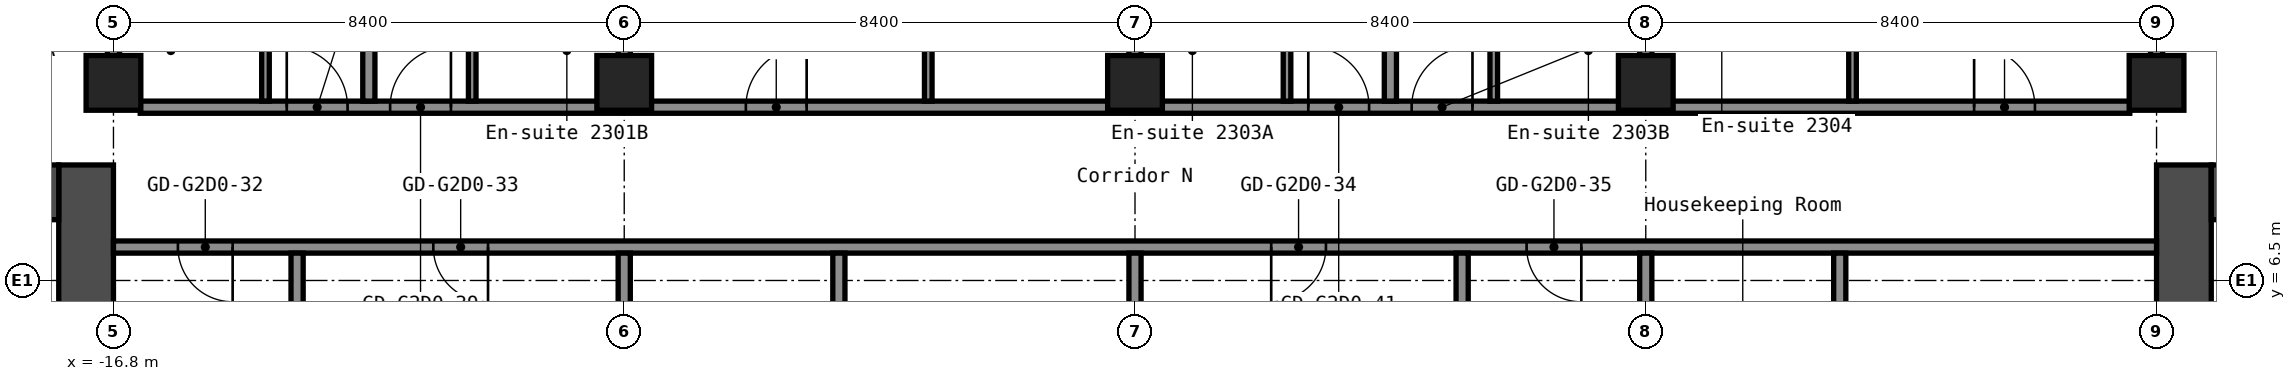
"""IFC4 building model, lengths in metres.
Left out: names, types, materials, properties, quantities, classifications, styles, units other than length and angle.
Written with IfcOpenShell. Run it as: python <this file> out.ifc"""

import sys

from ifc_helpers import new_model, si_unit, direction, frame, frame_2d, origin, origin_2d, place, context, subcontext, project, spatial, rectangle, hollow_rectangle, extrude, element, fill, save


model = new_model("IFC4")
c1 = context("Model", 3, precision=1e-05, world=origin(), true_north=direction((0.0, 1.0)))
c2 = subcontext(c1, "Body", "Model", "MODEL_VIEW")
j1 = project(units=[si_unit("LENGTHUNIT", "METRE"), si_unit("PLANEANGLEUNIT", "RADIAN")], contexts=[c1])
p1 = place(None, origin())
s1 = spatial("IfcSite", under=j1, at=p1, CompositionType="ELEMENT")
p2 = place(p1, origin())
s2 = spatial("IfcBuilding", under=s1, at=p2, CompositionType="ELEMENT")
p3 = place(p2, frame((0.0, 0.0, 85.0)))
s3 = spatial("IfcBuildingStorey", under=s2, at=p3, CompositionType="ELEMENT", Elevation=85.0)
for number, where, z_axis, x_axis in (
    (1, (-16.8, 9.75, 0.0), (0.0, 0.0, 1.0), (1.0, 0.0, 0.0)),
    (2, (-8.4, 9.75, 0.0), (0.0, 0.0, 1.0), (1.0, 0.0, 0.0)),
    (3, (0.0, 9.75, 0.0), (0.0, 0.0, 1.0), (1.0, 0.0, 0.0)),
    (4, (8.4, 9.75, 0.0), (0.0, 0.0, 1.0), (1.0, 0.0, 0.0)),
    (5, (16.8, 9.75, 0.0), (0.0, 0.0, 1.0), (1.0, 0.0, 0.0)),
):
    element("IfcColumn", number, at=place(p3, frame(where, z_axis=z_axis, x_axis=x_axis)), inside=s3, PredefinedType="COLUMN", context=c2, shape_type="SweptSolid", body=[
        extrude(hollow_rectangle(XDim=0.9, YDim=0.9, WallThickness=0.036, at=origin_2d()), origin(), (0.0, 0.0, 1.0), 2.8),
    ])
p4 = place(p3, frame((-17.25, -8.4, 0.0), z_axis=(0.0, 0.0, 1.0), x_axis=(0.0, 1.0, 0.0)))
e6 = element("IfcWall", 6, at=p4, inside=s3, PredefinedType="SHEAR", context=c2, shape_type="SweptSolid", body=[
    extrude(rectangle(XDim=16.8, YDim=0.9, at=frame_2d((8.4, 0.0))), origin(), (0.0, 0.0, 1.0), 2.8),
])
p5 = place(p4, frame((7.6, 0.0, 0.0)))
e7 = element("IfcOpeningElement", 7, at=p5, cuts=e6, PredefinedType="OPENING", context=c2, shape_type="SweptSolid", body=[
    extrude(rectangle(XDim=1.2, YDim=2.1, at=frame_2d((0.6, 1.05))), frame((0.0, 0.46, 0.0), z_axis=(0.0, -1.0, 0.0), x_axis=(1.0, 0.0, 0.0)), (0.0, 0.0, 1.0), 0.92),
])
p6 = place(p3, frame((-32.7, 7.95, 0.0), z_axis=(0.0, 0.0, 1.0), x_axis=(1.0, 0.0, 0.0)))
e8 = element("IfcWall", 8, at=p6, inside=s3, PredefinedType="SHEAR", context=c2, shape_type="SweptSolid", body=[
    extrude(rectangle(XDim=15.0, YDim=0.9, at=frame_2d((7.5, 0.0))), origin(), (0.0, 0.0, 1.0), 2.8),
])
p7 = place(p6, frame((3.4, 0.0, 0.0)))
e9 = element("IfcOpeningElement", 9, at=p7, cuts=e8, PredefinedType="OPENING", context=c2, shape_type="SweptSolid", body=[
    extrude(rectangle(XDim=1.2, YDim=2.1, at=frame_2d((0.6, 1.05))), frame((0.0, 0.46, 0.0), z_axis=(0.0, -1.0, 0.0), x_axis=(1.0, 0.0, 0.0)), (0.0, 0.0, 1.0), 0.92),
])
p8 = place(p6, frame((0.75, 0.0, 0.0)))
e10 = element("IfcOpeningElement", 10, at=p8, cuts=e8, PredefinedType="OPENING", context=c2, shape_type="SweptSolid", body=[
    extrude(rectangle(XDim=0.9, YDim=2.1, at=frame_2d((0.45, 1.05))), frame((0.0, 0.46, 0.0), z_axis=(0.0, -1.0, 0.0), x_axis=(1.0, 0.0, 0.0)), (0.0, 0.0, 1.0), 0.92),
])
p9 = place(p3, frame((17.25, -8.4, 0.0), z_axis=(0.0, 0.0, 1.0), x_axis=(0.0, 1.0, 0.0)))
e11 = element("IfcWall", 11, at=p9, inside=s3, PredefinedType="SHEAR", context=c2, shape_type="SweptSolid", body=[
    extrude(rectangle(XDim=16.8, YDim=0.9, at=frame_2d((8.4, 0.0))), origin(), (0.0, 0.0, 1.0), 2.8),
])
p10 = place(p9, frame((7.6, 0.0, 0.0)))
e12 = element("IfcOpeningElement", 12, at=p10, cuts=e11, PredefinedType="OPENING", context=c2, shape_type="SweptSolid", body=[
    extrude(rectangle(XDim=1.2, YDim=2.1, at=frame_2d((0.6, 1.05))), frame((0.0, 0.46, 0.0), z_axis=(0.0, -1.0, 0.0), x_axis=(1.0, 0.0, 0.0)), (0.0, 0.0, 1.0), 0.92),
])
p11 = place(p3, frame((17.7, 7.95, 0.0), z_axis=(0.0, 0.0, 1.0), x_axis=(1.0, 0.0, 0.0)))
e13 = element("IfcWall", 13, at=p11, inside=s3, PredefinedType="SHEAR", context=c2, shape_type="SweptSolid", body=[
    extrude(rectangle(XDim=15.0, YDim=0.9, at=frame_2d((7.5, 0.0))), origin(), (0.0, 0.0, 1.0), 2.8),
])
p12 = place(p11, frame((10.4, 0.0, 0.0)))
e14 = element("IfcOpeningElement", 14, at=p12, cuts=e13, PredefinedType="OPENING", context=c2, shape_type="SweptSolid", body=[
    extrude(rectangle(XDim=1.2, YDim=2.1, at=frame_2d((0.6, 1.05))), frame((0.0, 0.46, 0.0), z_axis=(0.0, -1.0, 0.0), x_axis=(1.0, 0.0, 0.0)), (0.0, 0.0, 1.0), 0.92),
])
p13 = place(p11, frame((13.35, 0.0, 0.0)))
e15 = element("IfcOpeningElement", 15, at=p13, cuts=e13, PredefinedType="OPENING", context=c2, shape_type="SweptSolid", body=[
    extrude(rectangle(XDim=0.9, YDim=2.1, at=frame_2d((0.45, 1.05))), frame((0.0, 0.46, 0.0), z_axis=(0.0, -1.0, 0.0), x_axis=(1.0, 0.0, 0.0)), (0.0, 0.0, 1.0), 0.92),
])
p14 = place(p3, frame((-16.8, 7.05, 0.0), z_axis=(0.0, 0.0, 1.0), x_axis=(1.0, 0.0, 0.0)))
e16 = element("IfcWall", 16, at=p14, inside=s3, PredefinedType="PARTITIONING", context=c2, shape_type="SweptSolid", body=[
    extrude(rectangle(XDim=33.6, YDim=0.2, at=frame_2d((16.8, 0.0))), origin(), (0.0, 0.0, 1.0), 2.8),
])
p15 = place(p14, frame((1.06, 0.0, 0.0)))
e17 = element("IfcOpeningElement", 17, at=p15, cuts=e16, PredefinedType="OPENING", context=c2, shape_type="SweptSolid", body=[
    extrude(rectangle(XDim=0.9, YDim=2.1, at=frame_2d((0.45, 1.05))), frame((0.0, 0.11, 0.0), z_axis=(0.0, -1.0, 0.0), x_axis=(1.0, 0.0, 0.0)), (0.0, 0.0, 1.0), 0.22),
])
p16 = place(p14, frame((5.26, 0.0, 0.0)))
e18 = element("IfcOpeningElement", 18, at=p16, cuts=e16, PredefinedType="OPENING", context=c2, shape_type="SweptSolid", body=[
    extrude(rectangle(XDim=0.9, YDim=2.1, at=frame_2d((0.45, 1.05))), frame((0.0, 0.11, 0.0), z_axis=(0.0, -1.0, 0.0), x_axis=(1.0, 0.0, 0.0)), (0.0, 0.0, 1.0), 0.22),
])
p17 = place(p14, frame((19.04, 0.0, 0.0)))
e19 = element("IfcOpeningElement", 19, at=p17, cuts=e16, PredefinedType="OPENING", context=c2, shape_type="SweptSolid", body=[
    extrude(rectangle(XDim=0.9, YDim=2.1, at=frame_2d((0.45, 1.05))), frame((0.0, 0.11, 0.0), z_axis=(0.0, -1.0, 0.0), x_axis=(1.0, 0.0, 0.0)), (0.0, 0.0, 1.0), 0.22),
])
p18 = place(p14, frame((23.24, 0.0, 0.0)))
e20 = element("IfcOpeningElement", 20, at=p18, cuts=e16, PredefinedType="OPENING", context=c2, shape_type="SweptSolid", body=[
    extrude(rectangle(XDim=0.9, YDim=2.1, at=frame_2d((0.45, 1.05))), frame((0.0, 0.11, 0.0), z_axis=(0.0, -1.0, 0.0), x_axis=(1.0, 0.0, 0.0)), (0.0, 0.0, 1.0), 0.22),
])
p19 = place(p3, frame((-16.36, 9.35, 0.0), z_axis=(0.0, 0.0, 1.0), x_axis=(1.0, 0.0, 0.0)))
e21 = element("IfcWall", 21, at=p19, inside=s3, PredefinedType="PARTITIONING", context=c2, shape_type="SweptSolid", body=[
    extrude(rectangle(XDim=32.72, YDim=0.2, at=frame_2d((16.36, 0.0))), origin(), (0.0, 0.0, 1.0), 2.8),
])
p20 = place(p19, frame((2.41, 0.0, 0.0)))
e22 = element("IfcOpeningElement", 22, at=p20, cuts=e21, PredefinedType="OPENING", context=c2, shape_type="SweptSolid", body=[
    extrude(rectangle(XDim=1.0, YDim=2.1, at=frame_2d((0.5, 1.05))), frame((0.0, 0.11, 0.0), z_axis=(0.0, -1.0, 0.0), x_axis=(1.0, 0.0, 0.0)), (0.0, 0.0, 1.0), 0.22),
])
p21 = place(p19, frame((4.11, 0.0, 0.0)))
e23 = element("IfcOpeningElement", 23, at=p21, cuts=e21, PredefinedType="OPENING", context=c2, shape_type="SweptSolid", body=[
    extrude(rectangle(XDim=1.0, YDim=2.1, at=frame_2d((0.5, 1.05))), frame((0.0, 0.11, 0.0), z_axis=(0.0, -1.0, 0.0), x_axis=(1.0, 0.0, 0.0)), (0.0, 0.0, 1.0), 0.22),
])
p22 = place(p19, frame((9.96, 0.0, 0.0)))
e24 = element("IfcOpeningElement", 24, at=p22, cuts=e21, PredefinedType="OPENING", context=c2, shape_type="SweptSolid", body=[
    extrude(rectangle(XDim=1.0, YDim=2.1, at=frame_2d((0.5, 1.05))), frame((0.0, 0.11, 0.0), z_axis=(0.0, -1.0, 0.0), x_axis=(1.0, 0.0, 0.0)), (0.0, 0.0, 1.0), 0.22),
])
p23 = place(p19, frame((19.21, 0.0, 0.0)))
e25 = element("IfcOpeningElement", 25, at=p23, cuts=e21, PredefinedType="OPENING", context=c2, shape_type="SweptSolid", body=[
    extrude(rectangle(XDim=1.0, YDim=2.1, at=frame_2d((0.5, 1.05))), frame((0.0, 0.11, 0.0), z_axis=(0.0, -1.0, 0.0), x_axis=(1.0, 0.0, 0.0)), (0.0, 0.0, 1.0), 0.22),
])
p24 = place(p19, frame((20.91, 0.0, 0.0)))
e26 = element("IfcOpeningElement", 26, at=p24, cuts=e21, PredefinedType="OPENING", context=c2, shape_type="SweptSolid", body=[
    extrude(rectangle(XDim=1.0, YDim=2.1, at=frame_2d((0.5, 1.05))), frame((0.0, 0.11, 0.0), z_axis=(0.0, -1.0, 0.0), x_axis=(1.0, 0.0, 0.0)), (0.0, 0.0, 1.0), 0.22),
])
p25 = place(p19, frame((30.16, 0.0, 0.0)))
e27 = element("IfcOpeningElement", 27, at=p25, cuts=e21, PredefinedType="OPENING", context=c2, shape_type="SweptSolid", body=[
    extrude(rectangle(XDim=1.0, YDim=2.1, at=frame_2d((0.5, 1.05))), frame((0.0, 0.11, 0.0), z_axis=(0.0, -1.0, 0.0), x_axis=(1.0, 0.0, 0.0)), (0.0, 0.0, 1.0), 0.22),
])
p26 = place(p3, frame((-16.8, 10.19, 0.0), z_axis=(0.0, 0.0, 1.0), x_axis=(0.0, 1.0, 0.0)))
e28 = element("IfcWall", 28, at=p26, inside=s3, PredefinedType="PARTITIONING", context=c2, shape_type="SweptSolid", body=[
    extrude(rectangle(XDim=13.36, YDim=0.2, at=frame_2d((6.68, 0.0))), origin(), (0.0, 0.0, 1.0), 2.8),
])
p27 = place(p3, frame((-14.3, 9.45, 0.0), z_axis=(0.0, 0.0, 1.0), x_axis=(0.0, 1.0, 0.0)))
e29 = element("IfcWall", 29, at=p27, inside=s3, PredefinedType="PARTITIONING", context=c2, shape_type="SweptSolid", body=[
    extrude(rectangle(XDim=2.9, YDim=0.125, at=frame_2d((1.45, 0.0))), origin(), (0.0, 0.0, 1.0), 2.8),
])
p28 = place(p27, frame((1.5, 0.0, 0.0)))
e30 = element("IfcOpeningElement", 30, at=p28, cuts=e29, PredefinedType="OPENING", context=c2, shape_type="SweptSolid", body=[
    extrude(rectangle(XDim=0.8, YDim=2.1, at=frame_2d((0.4, 1.05))), frame((0.0, 0.073, 0.0), z_axis=(0.0, -1.0, 0.0), x_axis=(1.0, 0.0, 0.0)), (0.0, 0.0, 1.0), 0.145),
])
p29 = place(p3, frame((-13.78, 1.05, 0.0), z_axis=(0.0, 0.0, 1.0), x_axis=(0.0, 1.0, 0.0)))
e31 = element("IfcWall", 31, at=p29, inside=s3, PredefinedType="PARTITIONING", context=c2, shape_type="SweptSolid", body=[
    extrude(rectangle(XDim=5.9, YDim=0.2, at=frame_2d((2.95, 0.0))), origin(), (0.0, 0.0, 1.0), 2.8),
])
p30 = place(p3, frame((-12.6, 9.45, 0.0), z_axis=(0.0, 0.0, 1.0), x_axis=(0.0, 1.0, 0.0)))
e32 = element("IfcWall", 32, at=p30, inside=s3, PredefinedType="PARTITIONING", context=c2, shape_type="SweptSolid", body=[
    extrude(rectangle(XDim=14.1, YDim=0.2, at=frame_2d((7.05, 0.0))), origin(), (0.0, 0.0, 1.0), 2.8),
])
p31 = place(p3, frame((-10.9, 9.45, 0.0), z_axis=(0.0, 0.0, 1.0), x_axis=(0.0, 1.0, 0.0)))
e33 = element("IfcWall", 33, at=p31, inside=s3, PredefinedType="PARTITIONING", context=c2, shape_type="SweptSolid", body=[
    extrude(rectangle(XDim=2.9, YDim=0.125, at=frame_2d((1.45, 0.0))), origin(), (0.0, 0.0, 1.0), 2.8),
])
p32 = place(p31, frame((1.5, 0.0, 0.0)))
e34 = element("IfcOpeningElement", 34, at=p32, cuts=e33, PredefinedType="OPENING", context=c2, shape_type="SweptSolid", body=[
    extrude(rectangle(XDim=0.8, YDim=2.1, at=frame_2d((0.4, 1.05))), frame((0.0, 0.073, 0.0), z_axis=(0.0, -1.0, 0.0), x_axis=(1.0, 0.0, 0.0)), (0.0, 0.0, 1.0), 0.145),
])
p33 = place(p3, frame((-8.4, 1.05, 0.0), z_axis=(0.0, 0.0, 1.0), x_axis=(0.0, 1.0, 0.0)))
e35 = element("IfcWall", 35, at=p33, inside=s3, PredefinedType="PARTITIONING", context=c2, shape_type="SweptSolid", body=[
    extrude(rectangle(XDim=5.9, YDim=0.2, at=frame_2d((2.95, 0.0))), origin(), (0.0, 0.0, 1.0), 2.8),
])
p34 = place(p3, frame((-8.4, 10.19, 0.0), z_axis=(0.0, 0.0, 1.0), x_axis=(0.0, 1.0, 0.0)))
e36 = element("IfcWall", 36, at=p34, inside=s3, PredefinedType="PARTITIONING", context=c2, shape_type="SweptSolid", body=[
    extrude(rectangle(XDim=13.36, YDim=0.2, at=frame_2d((6.68, 0.0))), origin(), (0.0, 0.0, 1.0), 2.8),
])
p35 = place(p3, frame((-4.87, 1.05, 0.0), z_axis=(0.0, 0.0, 1.0), x_axis=(0.0, 1.0, 0.0)))
e37 = element("IfcWall", 37, at=p35, inside=s3, PredefinedType="PARTITIONING", context=c2, shape_type="SweptSolid", body=[
    extrude(rectangle(XDim=5.9, YDim=0.2, at=frame_2d((2.95, 0.0))), origin(), (0.0, 0.0, 1.0), 2.8),
])
p36 = place(p3, frame((-3.4, 9.45, 0.0), z_axis=(0.0, 0.0, 1.0), x_axis=(0.0, 1.0, 0.0)))
e38 = element("IfcWall", 38, at=p36, inside=s3, PredefinedType="PARTITIONING", context=c2, shape_type="SweptSolid", body=[
    extrude(rectangle(XDim=3.3, YDim=0.125, at=frame_2d((1.65, 0.0))), origin(), (0.0, 0.0, 1.0), 2.8),
])
p37 = place(p3, frame((0.0, 1.05, 0.0), z_axis=(0.0, 0.0, 1.0), x_axis=(0.0, 1.0, 0.0)))
e39 = element("IfcWall", 39, at=p37, inside=s3, PredefinedType="PARTITIONING", context=c2, shape_type="SweptSolid", body=[
    extrude(rectangle(XDim=5.9, YDim=0.2, at=frame_2d((2.95, 0.0))), origin(), (0.0, 0.0, 1.0), 2.8),
])
p38 = place(p3, frame((0.0, 10.19, 0.0), z_axis=(0.0, 0.0, 1.0), x_axis=(0.0, 1.0, 0.0)))
e40 = element("IfcWall", 40, at=p38, inside=s3, PredefinedType="PARTITIONING", context=c2, shape_type="SweptSolid", body=[
    extrude(rectangle(XDim=13.36, YDim=0.2, at=frame_2d((6.68, 0.0))), origin(), (0.0, 0.0, 1.0), 2.8),
])
p39 = place(p3, frame((2.5, 9.45, 0.0), z_axis=(0.0, 0.0, 1.0), x_axis=(0.0, 1.0, 0.0)))
e41 = element("IfcWall", 41, at=p39, inside=s3, PredefinedType="PARTITIONING", context=c2, shape_type="SweptSolid", body=[
    extrude(rectangle(XDim=2.9, YDim=0.125, at=frame_2d((1.45, 0.0))), origin(), (0.0, 0.0, 1.0), 2.8),
])
p40 = place(p39, frame((1.5, 0.0, 0.0)))
e42 = element("IfcOpeningElement", 42, at=p40, cuts=e41, PredefinedType="OPENING", context=c2, shape_type="SweptSolid", body=[
    extrude(rectangle(XDim=0.8, YDim=2.1, at=frame_2d((0.4, 1.05))), frame((0.0, 0.073, 0.0), z_axis=(0.0, -1.0, 0.0), x_axis=(1.0, 0.0, 0.0)), (0.0, 0.0, 1.0), 0.145),
])
p41 = place(p3, frame((4.2, 9.45, 0.0), z_axis=(0.0, 0.0, 1.0), x_axis=(0.0, 1.0, 0.0)))
e43 = element("IfcWall", 43, at=p41, inside=s3, PredefinedType="PARTITIONING", context=c2, shape_type="SweptSolid", body=[
    extrude(rectangle(XDim=14.1, YDim=0.2, at=frame_2d((7.05, 0.0))), origin(), (0.0, 0.0, 1.0), 2.8),
])
p42 = place(p3, frame((5.38, 1.05, 0.0), z_axis=(0.0, 0.0, 1.0), x_axis=(0.0, 1.0, 0.0)))
e44 = element("IfcWall", 44, at=p42, inside=s3, PredefinedType="PARTITIONING", context=c2, shape_type="SweptSolid", body=[
    extrude(rectangle(XDim=5.9, YDim=0.2, at=frame_2d((2.95, 0.0))), origin(), (0.0, 0.0, 1.0), 2.8),
])
p43 = place(p3, frame((5.9, 9.45, 0.0), z_axis=(0.0, 0.0, 1.0), x_axis=(0.0, 1.0, 0.0)))
e45 = element("IfcWall", 45, at=p43, inside=s3, PredefinedType="PARTITIONING", context=c2, shape_type="SweptSolid", body=[
    extrude(rectangle(XDim=2.9, YDim=0.125, at=frame_2d((1.45, 0.0))), origin(), (0.0, 0.0, 1.0), 2.8),
])
p44 = place(p43, frame((1.5, 0.0, 0.0)))
e46 = element("IfcOpeningElement", 46, at=p44, cuts=e45, PredefinedType="OPENING", context=c2, shape_type="SweptSolid", body=[
    extrude(rectangle(XDim=0.8, YDim=2.1, at=frame_2d((0.4, 1.05))), frame((0.0, 0.073, 0.0), z_axis=(0.0, -1.0, 0.0), x_axis=(1.0, 0.0, 0.0)), (0.0, 0.0, 1.0), 0.145),
])
p45 = place(p3, frame((8.4, 1.05, 0.0), z_axis=(0.0, 0.0, 1.0), x_axis=(0.0, 1.0, 0.0)))
e47 = element("IfcWall", 47, at=p45, inside=s3, PredefinedType="PARTITIONING", context=c2, shape_type="SweptSolid", body=[
    extrude(rectangle(XDim=5.9, YDim=0.2, at=frame_2d((2.95, 0.0))), origin(), (0.0, 0.0, 1.0), 2.8),
])
p46 = place(p3, frame((8.4, 10.19, 0.0), z_axis=(0.0, 0.0, 1.0), x_axis=(0.0, 1.0, 0.0)))
e48 = element("IfcWall", 48, at=p46, inside=s3, PredefinedType="PARTITIONING", context=c2, shape_type="SweptSolid", body=[
    extrude(rectangle(XDim=13.36, YDim=0.2, at=frame_2d((6.68, 0.0))), origin(), (0.0, 0.0, 1.0), 2.8),
])
p47 = place(p3, frame((11.59, 1.05, 0.0), z_axis=(0.0, 0.0, 1.0), x_axis=(0.0, 1.0, 0.0)))
e49 = element("IfcWall", 49, at=p47, inside=s3, PredefinedType="PARTITIONING", context=c2, shape_type="SweptSolid", body=[
    extrude(rectangle(XDim=5.9, YDim=0.2, at=frame_2d((2.95, 0.0))), origin(), (0.0, 0.0, 1.0), 2.8),
])
p48 = place(p3, frame((11.8, 9.45, 0.0), z_axis=(0.0, 0.0, 1.0), x_axis=(0.0, 1.0, 0.0)))
e50 = element("IfcWall", 50, at=p48, inside=s3, PredefinedType="PARTITIONING", context=c2, shape_type="SweptSolid", body=[
    extrude(rectangle(XDim=3.3, YDim=0.125, at=frame_2d((1.65, 0.0))), origin(), (0.0, 0.0, 1.0), 2.8),
])
p49 = place(p3, frame((16.8, 10.19, 0.0), z_axis=(0.0, 0.0, 1.0), x_axis=(0.0, 1.0, 0.0)))
e51 = element("IfcWall", 51, at=p49, inside=s3, PredefinedType="PARTITIONING", context=c2, shape_type="SweptSolid", body=[
    extrude(rectangle(XDim=13.36, YDim=0.2, at=frame_2d((6.68, 0.0))), origin(), (0.0, 0.0, 1.0), 2.8),
])
p50 = place(p15, origin())
e52 = element("IfcDoor", 52, at=p50, inside=s3, OperationType="SINGLE_SWING_RIGHT", PredefinedType="DOOR", context=c2, shape_type="SweptSolid", body=[
    extrude(rectangle(XDim=0.9, YDim=2.1, at=frame_2d((0.45, 1.05))), frame((0.0, 0.025, 0.0), z_axis=(0.0, -1.0, 0.0), x_axis=(1.0, 0.0, 0.0)), (0.0, 0.0, 1.0), 0.05),
])
fill(e17, e52)
p51 = place(p16, origin())
e53 = element("IfcDoor", 53, at=p51, inside=s3, OperationType="SINGLE_SWING_RIGHT", PredefinedType="DOOR", context=c2, shape_type="SweptSolid", body=[
    extrude(rectangle(XDim=0.9, YDim=2.1, at=frame_2d((0.45, 1.05))), frame((0.0, 0.025, 0.0), z_axis=(0.0, -1.0, 0.0), x_axis=(1.0, 0.0, 0.0)), (0.0, 0.0, 1.0), 0.05),
])
fill(e18, e53)
p52 = place(p17, origin())
e54 = element("IfcDoor", 54, at=p52, inside=s3, OperationType="SINGLE_SWING_LEFT", PredefinedType="DOOR", context=c2, shape_type="SweptSolid", body=[
    extrude(rectangle(XDim=0.9, YDim=2.1, at=frame_2d((0.45, 1.05))), frame((0.0, 0.025, 0.0), z_axis=(0.0, -1.0, 0.0), x_axis=(1.0, 0.0, 0.0)), (0.0, 0.0, 1.0), 0.05),
])
fill(e19, e54)
p53 = place(p18, origin())
e55 = element("IfcDoor", 55, at=p53, inside=s3, OperationType="SINGLE_SWING_RIGHT", PredefinedType="DOOR", context=c2, shape_type="SweptSolid", body=[
    extrude(rectangle(XDim=0.9, YDim=2.1, at=frame_2d((0.45, 1.05))), frame((0.0, 0.025, 0.0), z_axis=(0.0, -1.0, 0.0), x_axis=(1.0, 0.0, 0.0)), (0.0, 0.0, 1.0), 0.05),
])
fill(e20, e55)
p54 = place(p20, origin())
e56 = element("IfcDoor", 56, at=p54, inside=s3, OperationType="SINGLE_SWING_RIGHT", PredefinedType="DOOR", context=c2, shape_type="SweptSolid", body=[
    extrude(rectangle(XDim=1.0, YDim=2.1, at=frame_2d((0.5, 1.05))), frame((0.0, 0.025, 0.0), z_axis=(0.0, -1.0, 0.0), x_axis=(1.0, 0.0, 0.0)), (0.0, 0.0, 1.0), 0.05),
])
fill(e22, e56)
p55 = place(p21, origin())
e57 = element("IfcDoor", 57, at=p55, inside=s3, OperationType="SINGLE_SWING_LEFT", PredefinedType="DOOR", context=c2, shape_type="SweptSolid", body=[
    extrude(rectangle(XDim=1.0, YDim=2.1, at=frame_2d((0.5, 1.05))), frame((0.0, 0.025, 0.0), z_axis=(0.0, -1.0, 0.0), x_axis=(1.0, 0.0, 0.0)), (0.0, 0.0, 1.0), 0.05),
])
fill(e23, e57)
p56 = place(p22, origin())
e58 = element("IfcDoor", 58, at=p56, inside=s3, OperationType="SINGLE_SWING_LEFT", PredefinedType="DOOR", context=c2, shape_type="SweptSolid", body=[
    extrude(rectangle(XDim=1.0, YDim=2.1, at=frame_2d((0.5, 1.05))), frame((0.0, 0.025, 0.0), z_axis=(0.0, -1.0, 0.0), x_axis=(1.0, 0.0, 0.0)), (0.0, 0.0, 1.0), 0.05),
])
fill(e24, e58)
p57 = place(p23, origin())
e59 = element("IfcDoor", 59, at=p57, inside=s3, OperationType="SINGLE_SWING_RIGHT", PredefinedType="DOOR", context=c2, shape_type="SweptSolid", body=[
    extrude(rectangle(XDim=1.0, YDim=2.1, at=frame_2d((0.5, 1.05))), frame((0.0, 0.025, 0.0), z_axis=(0.0, -1.0, 0.0), x_axis=(1.0, 0.0, 0.0)), (0.0, 0.0, 1.0), 0.05),
])
fill(e25, e59)
p58 = place(p24, origin())
e60 = element("IfcDoor", 60, at=p58, inside=s3, OperationType="SINGLE_SWING_LEFT", PredefinedType="DOOR", context=c2, shape_type="SweptSolid", body=[
    extrude(rectangle(XDim=1.0, YDim=2.1, at=frame_2d((0.5, 1.05))), frame((0.0, 0.025, 0.0), z_axis=(0.0, -1.0, 0.0), x_axis=(1.0, 0.0, 0.0)), (0.0, 0.0, 1.0), 0.05),
])
fill(e26, e60)
p59 = place(p25, origin())
e61 = element("IfcDoor", 61, at=p59, inside=s3, OperationType="SINGLE_SWING_RIGHT", PredefinedType="DOOR", context=c2, shape_type="SweptSolid", body=[
    extrude(rectangle(XDim=1.0, YDim=2.1, at=frame_2d((0.5, 1.05))), frame((0.0, 0.025, 0.0), z_axis=(0.0, -1.0, 0.0), x_axis=(1.0, 0.0, 0.0)), (0.0, 0.0, 1.0), 0.05),
])
fill(e27, e61)
save(model, sys.argv[1])
